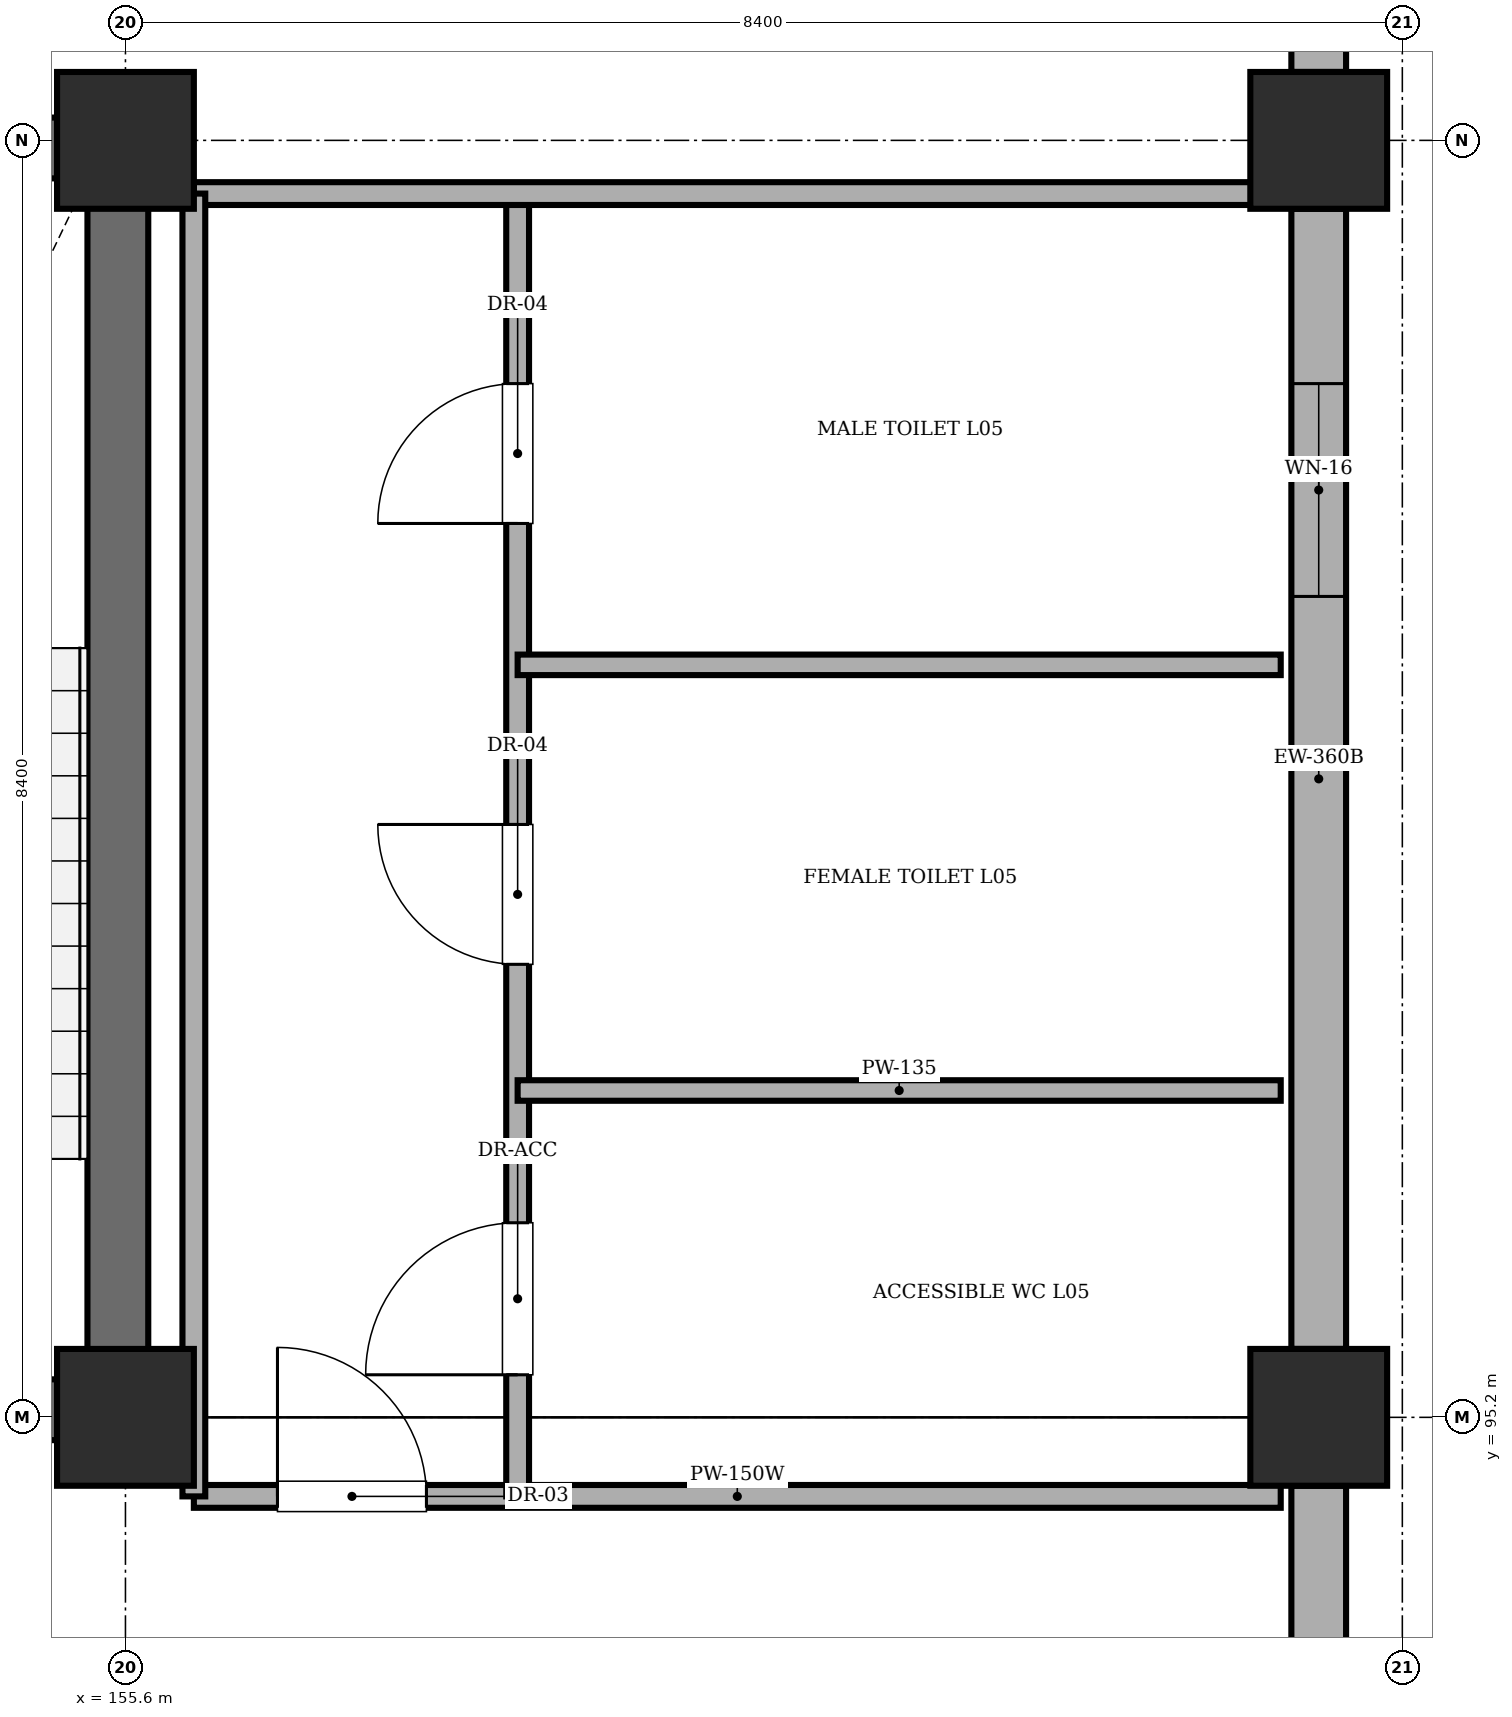
"""IFC4 building model, lengths in metres.
Left out: names, types, materials, properties, quantities, classifications, styles, units other than length and angle.
Written with IfcOpenShell. Run it as: python <this file> out.ifc"""

import sys

from ifc_helpers import new_model, si_unit, direction, frame, frame_2d, origin, origin_2d, place, context, subcontext, project, spatial, rectangle, extrude, element, fill, save


model = new_model("IFC4")
c1 = context("Model", 3, precision=1e-05, world=origin(), true_north=direction((0.0, 1.0)))
c2 = subcontext(c1, "Body", "Model", "MODEL_VIEW")
j1 = project(units=[si_unit("LENGTHUNIT", "METRE"), si_unit("PLANEANGLEUNIT", "RADIAN")], contexts=[c1])
p1 = place(None, origin())
s1 = spatial("IfcSite", under=j1, at=p1, CompositionType="ELEMENT")
p2 = place(p1, origin())
s2 = spatial("IfcBuilding", under=s1, at=p2, CompositionType="ELEMENT")
p3 = place(p2, frame((0.0, 0.0, 19.2)))
s3 = spatial("IfcBuildingStorey", under=s2, at=p3, CompositionType="ELEMENT", Elevation=19.2)
for number, where, z_axis, x_axis in (
    (1, (155.6, 95.2, 0.0), (0.0, 0.0, 1.0), (1.0, 0.0, 0.0)),
    (2, (155.6, 103.6, 0.0), (0.0, 0.0, 1.0), (1.0, 0.0, 0.0)),
    (3, (163.45, 95.2, 0.0), (0.0, 0.0, 1.0), (1.0, 0.0, 0.0)),
    (4, (163.45, 103.6, 0.0), (0.0, 0.0, 1.0), (1.0, 0.0, 0.0)),
):
    element("IfcColumn", number, at=place(p3, frame(where, z_axis=z_axis, x_axis=x_axis)), inside=s3, PredefinedType="COLUMN", context=c2, shape_type="SweptSolid", body=[
        extrude(rectangle(XDim=0.9, YDim=0.9, at=origin_2d()), origin(), (0.0, 0.0, 1.0), 4.02),
    ])
for number, where, z_axis, x_axis in (
    (5, (151.85, 95.25, 0.0), (0.0, 0.0, 1.0), (1.0, 0.0, 0.0)),
    (6, (151.85, 103.55, 0.0), (0.0, 0.0, 1.0), (1.0, 0.0, 0.0)),
):
    element("IfcWall", number, at=place(p3, frame(where, z_axis=z_axis, x_axis=x_axis)), inside=s3, PredefinedType="SHEAR", context=c2, shape_type="SweptSolid", body=[
        extrude(rectangle(XDim=3.9, YDim=0.4, at=frame_2d((1.95, 0.0))), origin(), (0.0, 0.0, 1.0), 4.02),
    ])
p4 = place(p3, frame((155.55, 95.45, 0.0), z_axis=(0.0, 0.0, 1.0), x_axis=(0.0, 1.0, 0.0)))
e7 = element("IfcWall", 7, at=p4, inside=s3, PredefinedType="SHEAR", context=c2, shape_type="SweptSolid", body=[
    extrude(rectangle(XDim=7.9, YDim=0.4, at=frame_2d((3.95, 0.0))), origin(), (0.0, 0.0, 1.0), 4.02),
])
p5 = place(p3, frame((163.45, 94.75, 0.0), z_axis=(0.0, 0.0, 1.0), x_axis=(0.0, -1.0, 0.0)))
e8 = element("IfcWall", 8, at=p5, inside=s3, PredefinedType="STANDARD", context=c2, shape_type="SweptSolid", body=[
    extrude(rectangle(XDim=7.5, YDim=0.36, at=frame_2d((3.75, 0.0))), origin(), (0.0, 0.0, 1.0), 3.32),
])
p6 = place(p5, frame((4.2, 0.0, 1.1)))
e9 = element("IfcOpeningElement", 9, at=p6, cuts=e8, PredefinedType="OPENING", context=c2, shape_type="SweptSolid", body=[
    extrude(rectangle(XDim=1.8, YDim=1.8, at=frame_2d((0.9, 0.9))), frame((0.0, 0.19, 0.0), z_axis=(0.0, -1.0, 0.0), x_axis=(1.0, 0.0, 0.0)), (0.0, 0.0, 1.0), 0.38),
])
p7 = place(p3, frame((163.45, 103.15, 0.0), z_axis=(0.0, 0.0, 1.0), x_axis=(0.0, -1.0, 0.0)))
e10 = element("IfcWall", 10, at=p7, inside=s3, PredefinedType="STANDARD", context=c2, shape_type="SweptSolid", body=[
    extrude(rectangle(XDim=7.5, YDim=0.36, at=frame_2d((3.75, 0.0))), origin(), (0.0, 0.0, 1.0), 3.32),
])
p8 = place(p7, frame((1.15, 0.0, 1.1)))
e11 = element("IfcOpeningElement", 11, at=p8, cuts=e10, PredefinedType="OPENING", context=c2, shape_type="SweptSolid", body=[
    extrude(rectangle(XDim=1.4, YDim=1.4, at=frame_2d((0.7, 0.7))), frame((0.0, 0.19, 0.0), z_axis=(0.0, -1.0, 0.0), x_axis=(1.0, 0.0, 0.0)), (0.0, 0.0, 1.0), 0.38),
])
p9 = place(p3, frame((163.45, 111.0, 0.0), z_axis=(0.0, 0.0, 1.0), x_axis=(0.0, -1.0, 0.0)))
e12 = element("IfcWall", 12, at=p9, inside=s3, PredefinedType="STANDARD", context=c2, shape_type="SweptSolid", body=[
    extrude(rectangle(XDim=6.95, YDim=0.36, at=frame_2d((3.475, 0.0))), origin(), (0.0, 0.0, 1.0), 3.32),
])
p10 = place(p9, frame((1.15, 0.0, 1.1)))
e13 = element("IfcOpeningElement", 13, at=p10, cuts=e12, PredefinedType="OPENING", context=c2, shape_type="SweptSolid", body=[
    extrude(rectangle(XDim=1.8, YDim=1.8, at=frame_2d((0.9, 0.9))), frame((0.0, 0.19, 0.0), z_axis=(0.0, -1.0, 0.0), x_axis=(1.0, 0.0, 0.0)), (0.0, 0.0, 1.0), 0.38),
])
p11 = place(p3, frame((156.05, 94.68, 0.0), z_axis=(0.0, 0.0, 1.0), x_axis=(1.0, 0.0, 0.0)))
e14 = element("IfcWall", 14, at=p11, inside=s3, PredefinedType="PARTITIONING", context=c2, shape_type="SweptSolid", body=[
    extrude(rectangle(XDim=7.15, YDim=0.15, at=frame_2d((3.575, 0.0))), origin(), (0.0, 0.0, 1.0), 4.02),
])
p12 = place(p11, frame((0.55, 0.0, 0.0)))
e15 = element("IfcOpeningElement", 15, at=p12, cuts=e14, PredefinedType="OPENING", context=c2, shape_type="SweptSolid", body=[
    extrude(rectangle(XDim=0.98, YDim=2.12, at=frame_2d((0.49, 1.06))), frame((0.0, 0.085, 0.0), z_axis=(0.0, -1.0, 0.0), x_axis=(1.0, 0.0, 0.0)), (0.0, 0.0, 1.0), 0.17),
])
p13 = place(p3, frame((158.18, 94.68, 0.0), z_axis=(0.0, 0.0, 1.0), x_axis=(0.0, 1.0, 0.0)))
e16 = element("IfcWall", 16, at=p13, inside=s3, PredefinedType="PARTITIONING", context=c2, shape_type="SweptSolid", body=[
    extrude(rectangle(XDim=8.57, YDim=0.15, at=frame_2d((4.285, 0.0))), origin(), (0.0, 0.0, 1.0), 4.02),
])
p14 = place(p13, frame((0.8, 0.0, 0.0)))
e17 = element("IfcOpeningElement", 17, at=p14, cuts=e16, PredefinedType="OPENING", context=c2, shape_type="SweptSolid", body=[
    extrude(rectangle(XDim=1.0, YDim=2.12, at=frame_2d((0.5, 1.06))), frame((0.0, 0.085, 0.0), z_axis=(0.0, -1.0, 0.0), x_axis=(1.0, 0.0, 0.0)), (0.0, 0.0, 1.0), 0.17),
])
p15 = place(p13, frame((3.5, 0.0, 0.0)))
e18 = element("IfcOpeningElement", 18, at=p15, cuts=e16, PredefinedType="OPENING", context=c2, shape_type="SweptSolid", body=[
    extrude(rectangle(XDim=0.92, YDim=2.1, at=frame_2d((0.46, 1.05))), frame((0.0, 0.085, 0.0), z_axis=(0.0, -1.0, 0.0), x_axis=(1.0, 0.0, 0.0)), (0.0, 0.0, 1.0), 0.17),
])
p16 = place(p13, frame((6.4, 0.0, 0.0)))
e19 = element("IfcOpeningElement", 19, at=p16, cuts=e16, PredefinedType="OPENING", context=c2, shape_type="SweptSolid", body=[
    extrude(rectangle(XDim=0.92, YDim=2.1, at=frame_2d((0.46, 1.05))), frame((0.0, 0.085, 0.0), z_axis=(0.0, -1.0, 0.0), x_axis=(1.0, 0.0, 0.0)), (0.0, 0.0, 1.0), 0.17),
])
for number, where, z_axis, x_axis in (
    (20, (158.18, 97.35, 0.0), (0.0, 0.0, 1.0), (1.0, 0.0, 0.0)),
    (21, (158.18, 100.15, 0.0), (0.0, 0.0, 1.0), (1.0, 0.0, 0.0)),
):
    element("IfcWall", number, at=place(p3, frame(where, z_axis=z_axis, x_axis=x_axis)), inside=s3, PredefinedType="PARTITIONING", context=c2, shape_type="SweptSolid", body=[
        extrude(rectangle(XDim=5.02, YDim=0.135, at=frame_2d((2.51, 0.0))), origin(), (0.0, 0.0, 1.0), 4.02),
    ])
p17 = place(p3, frame((156.05, 103.25, 0.0), z_axis=(0.0, 0.0, 1.0), x_axis=(1.0, 0.0, 0.0)))
e22 = element("IfcWall", 22, at=p17, inside=s3, PredefinedType="PARTITIONING", context=c2, shape_type="SweptSolid", body=[
    extrude(rectangle(XDim=7.15, YDim=0.15, at=frame_2d((3.575, 0.0))), origin(), (0.0, 0.0, 1.0), 4.02),
])
p18 = place(p3, frame((156.05, 94.68, 0.0), z_axis=(0.0, 0.0, 1.0), x_axis=(0.0, 1.0, 0.0)))
e23 = element("IfcWall", 23, at=p18, inside=s3, PredefinedType="PARTITIONING", context=c2, shape_type="SweptSolid", body=[
    extrude(rectangle(XDim=8.57, YDim=0.15, at=frame_2d((4.285, 0.0))), origin(), (0.0, 0.0, 1.0), 4.02),
])
p19 = place(p8, origin())
e24 = element("IfcWindow", 24, at=p19, inside=s3, PartitioningType="SINGLE_PANEL", PredefinedType="WINDOW", context=c2, shape_type="SweptSolid", body=[
    extrude(rectangle(XDim=1.4, YDim=1.4, at=frame_2d((0.7, 0.7))), frame((0.0, 0.03, 0.0), z_axis=(0.0, -1.0, 0.0), x_axis=(1.0, 0.0, 0.0)), (0.0, 0.0, 1.0), 0.06),
])
fill(e11, e24)
p20 = place(p12, origin())
e25 = element("IfcDoor", 25, at=p20, inside=s3, OperationType="SINGLE_SWING_LEFT", PredefinedType="DOOR", context=c2, shape_type="SweptSolid", body=[
    extrude(rectangle(XDim=0.98, YDim=2.12, at=frame_2d((0.49, 1.06))), frame((0.0, 0.025, 0.0), z_axis=(0.0, -1.0, 0.0), x_axis=(1.0, 0.0, 0.0)), (0.0, 0.0, 1.0), 0.05),
])
fill(e15, e25)
p21 = place(p14, origin())
e26 = element("IfcDoor", 26, at=p21, inside=s3, OperationType="SINGLE_SWING_LEFT", PredefinedType="DOOR", context=c2, shape_type="SweptSolid", body=[
    extrude(rectangle(XDim=1.0, YDim=2.12, at=frame_2d((0.5, 1.06))), frame((0.0, 0.025, 0.0), z_axis=(0.0, -1.0, 0.0), x_axis=(1.0, 0.0, 0.0)), (0.0, 0.0, 1.0), 0.05),
])
fill(e17, e26)
p22 = place(p15, origin())
e27 = element("IfcDoor", 27, at=p22, inside=s3, OperationType="SINGLE_SWING_RIGHT", PredefinedType="DOOR", context=c2, shape_type="SweptSolid", body=[
    extrude(rectangle(XDim=0.92, YDim=2.1, at=frame_2d((0.46, 1.05))), frame((0.0, 0.025, 0.0), z_axis=(0.0, -1.0, 0.0), x_axis=(1.0, 0.0, 0.0)), (0.0, 0.0, 1.0), 0.05),
])
fill(e18, e27)
p23 = place(p16, origin())
e28 = element("IfcDoor", 28, at=p23, inside=s3, OperationType="SINGLE_SWING_LEFT", PredefinedType="DOOR", context=c2, shape_type="SweptSolid", body=[
    extrude(rectangle(XDim=0.92, YDim=2.1, at=frame_2d((0.46, 1.05))), frame((0.0, 0.025, 0.0), z_axis=(0.0, -1.0, 0.0), x_axis=(1.0, 0.0, 0.0)), (0.0, 0.0, 1.0), 0.05),
])
fill(e19, e28)
save(model, sys.argv[1])
